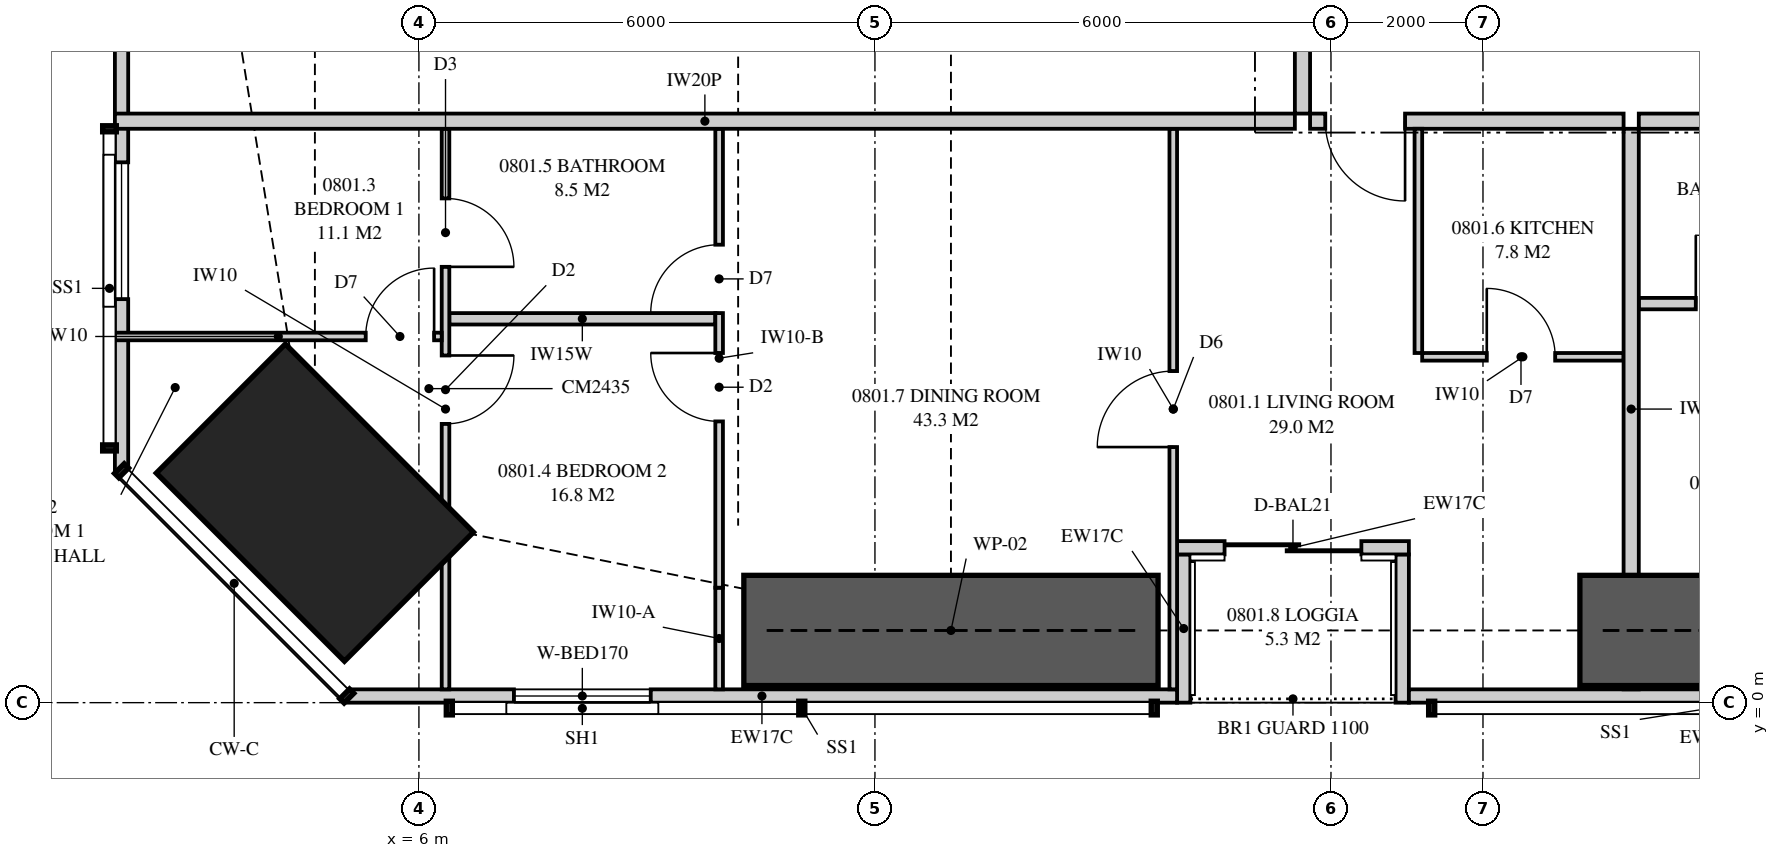
"""IFC4 building model, lengths in metres.
Left out: names, types, materials, properties, quantities, classifications, styles, units other than length and angle.
Written with IfcOpenShell. Run it as: python <this file> out.ifc"""

import sys

from ifc_helpers import new_model, si_unit, direction, frame, frame_2d, origin, origin_2d, place, context, subcontext, project, spatial, polyline, rectangle, outline, extrude, element, fill, save


model = new_model("IFC4")
c1 = context("Model", 3, precision=1e-05, world=origin(), true_north=direction((0.0, 1.0)))
c2 = subcontext(c1, "Body", "Model", "MODEL_VIEW")
j1 = project(units=[si_unit("LENGTHUNIT", "METRE"), si_unit("PLANEANGLEUNIT", "RADIAN")], contexts=[c1])
p1 = place(None, origin())
s1 = spatial("IfcSite", under=j1, at=p1, CompositionType="ELEMENT")
p2 = place(p1, origin())
s2 = spatial("IfcBuilding", under=s1, at=p2, CompositionType="ELEMENT")
p3 = place(p2, frame((0.0, 0.0, 34.4)))
s3 = spatial("IfcBuildingStorey", under=s2, at=p3, CompositionType="ELEMENT", Elevation=34.4)
p4 = place(p3, frame((4.631, 2.631, 0.0), z_axis=(0.0, 0.0, 1.0), x_axis=(0.707106781187, 0.707106781187, 0.0)))
e1 = element("IfcColumn", 1, at=p4, inside=s3, PredefinedType="COLUMN", context=c2, shape_type="SweptSolid", body=[
    extrude(rectangle(XDim=2.4, YDim=3.5, at=origin_2d()), origin(), (0.0, 0.0, 1.0), 3.35),
])
p5 = place(p3, frame((5.051, 0.087, 0.0), z_axis=(0.0, 0.0, 1.0), x_axis=(1.0, 0.0, 0.0)))
e2 = element("IfcWall", 2, at=p5, inside=s3, PredefinedType="SOLIDWALL", context=c2, shape_type="SweptSolid", body=[
    extrude(outline(polyline([(0.0, 0.0), (10.924, 0.0), (10.924, 2.15), (7.949, 2.15), (7.949, 3.11), (7.793, 3.11), (7.793, 2.15), (7.745, 2.15), (7.745, 3.11), (0.0, 3.11), (0.0, 0.0)])), frame((0.0, 0.087, 0.0), z_axis=(0.0, -1.0, 0.0), x_axis=(1.0, 0.0, 0.0)), (0.0, 0.0, 1.0), 0.175),
])
p6 = place(p5, frame((2.199, 0.0, 0.4)))
e3 = element("IfcOpeningElement", 3, at=p6, cuts=e2, PredefinedType="OPENING", context=c2, shape_type="SweptSolid", body=[
    extrude(rectangle(XDim=1.8, YDim=1.7, at=frame_2d((0.9, 0.85))), frame((0.0, 0.097, 0.0), z_axis=(0.0, -1.0, 0.0), x_axis=(1.0, 0.0, 0.0)), (0.0, 0.0, 1.0), 0.195),
])
p7 = place(p3, frame((19.025, 0.087, 0.0), z_axis=(0.0, 0.0, 1.0), x_axis=(1.0, 0.0, 0.0)))
e4 = element("IfcWall", 4, at=p7, inside=s3, PredefinedType="SOLIDWALL", context=c2, shape_type="SweptSolid", body=[
    extrude(rectangle(XDim=7.95, YDim=0.175, at=frame_2d((3.975, 0.0))), origin(), (0.0, 0.0, 1.0), 2.15),
])
p8 = place(p3, frame((15.975, 2.038, 0.0), z_axis=(0.0, 0.0, 1.0), x_axis=(1.0, 0.0, 0.0)))
e5 = element("IfcWall", 5, at=p8, inside=s3, PredefinedType="SOLIDWALL", context=c2, shape_type="SweptSolid", body=[
    extrude(rectangle(XDim=3.05, YDim=0.175, at=frame_2d((1.525, 0.0))), origin(), (0.0, 0.0, 1.0), 3.11),
])
p9 = place(p8, frame((0.625, 0.0, 0.0)))
e6 = element("IfcOpeningElement", 6, at=p9, cuts=e5, PredefinedType="OPENING", context=c2, shape_type="SweptSolid", body=[
    extrude(rectangle(XDim=1.8, YDim=2.1, at=frame_2d((0.9, 1.05))), frame((0.0, 0.097, 0.0), z_axis=(0.0, -1.0, 0.0), x_axis=(1.0, 0.0, 0.0)), (0.0, 0.0, 1.0), 0.195),
])
for number, where, z_axis, x_axis in (
    (7, (16.062, 0.0, 0.0), (0.0, 0.0, 1.0), (0.0, 1.0, 0.0)),
    (8, (18.938, 0.0, 0.0), (0.0, 0.0, 1.0), (0.0, 1.0, 0.0)),
):
    element("IfcWall", number, at=place(p3, frame(where, z_axis=z_axis, x_axis=x_axis)), inside=s3, PredefinedType="SOLIDWALL", context=c2, shape_type="SweptSolid", body=[
        extrude(outline(polyline([(0.0, 0.0), (1.95, 0.0), (1.95, 3.11), (1.75, 3.11), (1.75, 2.15), (0.15, 2.15), (0.15, 3.11), (0.0, 3.11), (0.0, 0.0)])), frame((0.0, 0.087, 0.0), z_axis=(0.0, -1.0, 0.0), x_axis=(1.0, 0.0, 0.0)), (0.0, 0.0, 1.0), 0.175),
    ])
p10 = place(p3, frame((2.087, 15.8, 0.0), z_axis=(0.0, 0.0, 1.0), x_axis=(0.0, -1.0, 0.0)))
e9 = element("IfcWall", 9, at=p10, inside=s3, PredefinedType="SOLIDWALL", context=c2, shape_type="SweptSolid", body=[
    extrude(outline(polyline([(0.0, 0.0), (12.749, 0.0), (12.749, 3.11), (3.019, 3.11), (3.019, 2.15), (2.926, 2.15), (2.926, 3.11), (2.8, 3.11), (2.8, 2.15), (0.0, 2.15), (0.0, 0.0)])), frame((0.0, 0.087, 0.0), z_axis=(0.0, -1.0, 0.0), x_axis=(1.0, 0.0, 0.0)), (0.0, 0.0, 1.0), 0.175),
])
p11 = place(p10, frame((5.65, 0.0, 0.4)))
e10 = element("IfcOpeningElement", 10, at=p11, cuts=e9, PredefinedType="OPENING", context=c2, shape_type="SweptSolid", body=[
    extrude(rectangle(XDim=1.2, YDim=1.7, at=frame_2d((0.6, 0.85))), frame((0.0, 0.097, 0.0), z_axis=(0.0, -1.0, 0.0), x_axis=(1.0, 0.0, 0.0)), (0.0, 0.0, 1.0), 0.195),
])
p12 = place(p10, frame((8.691, 0.0, 0.4)))
e11 = element("IfcOpeningElement", 11, at=p12, cuts=e9, PredefinedType="OPENING", context=c2, shape_type="SweptSolid", body=[
    extrude(rectangle(XDim=1.8, YDim=1.7, at=frame_2d((0.9, 0.85))), frame((0.0, 0.097, 0.0), z_axis=(0.0, -1.0, 0.0), x_axis=(1.0, 0.0, 0.0)), (0.0, 0.0, 1.0), 0.195),
])
p13 = place(p3, frame((21.95, 0.175, 0.0), z_axis=(0.0, 0.0, 1.0), x_axis=(0.0, 1.0, 0.0)))
e12 = element("IfcWall", 12, at=p13, inside=s3, PredefinedType="PARTITIONING", context=c2, shape_type="SweptSolid", body=[
    extrude(outline(polyline([(0.529, 2.15), (0.0, 2.15), (0.0, 0.0), (0.529, 0.0), (0.529, 0.09), (1.021, 0.09), (1.021, 0.0), (7.375, 0.0), (7.375, 3.11), (1.685, 3.11), (1.685, 2.15), (1.021, 2.15), (1.021, 2.06), (0.529, 2.06), (0.529, 2.15)])), frame((0.0, 0.1, 0.0), z_axis=(0.0, -1.0, 0.0), x_axis=(1.0, 0.0, 0.0)), (0.0, 0.0, 1.0), 0.2),
])
p14 = place(p3, frame((17.725, 7.65, 0.0), z_axis=(0.0, 0.0, 1.0), x_axis=(1.0, 0.0, 0.0)))
e13 = element("IfcWall", 13, at=p14, inside=s3, PredefinedType="PARTITIONING", context=c2, shape_type="SweptSolid", body=[
    extrude(rectangle(XDim=4.125, YDim=0.2, at=frame_2d((2.062, 0.0))), origin(), (0.0, 0.0, 1.0), 3.11),
])
p15 = place(p14, frame((0.2, 0.0, 0.0)))
e14 = element("IfcOpeningElement", 14, at=p15, cuts=e13, PredefinedType="OPENING", context=c2, shape_type="SweptSolid", body=[
    extrude(rectangle(XDim=1.05, YDim=2.2, at=frame_2d((0.525, 1.1))), frame((0.0, 0.11, 0.0), z_axis=(0.0, -1.0, 0.0), x_axis=(1.0, 0.0, 0.0)), (0.0, 0.0, 1.0), 0.22),
])
p16 = place(p3, frame((6.35, 0.175, 0.0), z_axis=(0.0, 0.0, 1.0), x_axis=(0.0, 1.0, 0.0)))
e15 = element("IfcWall", 15, at=p16, inside=s3, PredefinedType="PARTITIONING", context=c2, shape_type="SweptSolid", body=[
    extrude(outline(polyline([(0.0, 0.0), (7.375, 0.0), (7.375, 3.11), (2.988, 3.11), (2.988, 2.15), (1.234, 2.15), (1.234, 3.11), (0.0, 3.11), (0.0, 0.0)])), frame((0.0, 0.05, 0.0), z_axis=(0.0, -1.0, 0.0), x_axis=(1.0, 0.0, 0.0)), (0.0, 0.0, 1.0), 0.1),
])
p17 = place(p16, frame((3.492, 0.0, 0.0)))
e16 = element("IfcOpeningElement", 16, at=p17, cuts=e15, PredefinedType="OPENING", context=c2, shape_type="SweptSolid", body=[
    extrude(rectangle(XDim=0.9, YDim=2.1, at=frame_2d((0.45, 1.05))), frame((0.0, 0.06, 0.0), z_axis=(0.0, -1.0, 0.0), x_axis=(1.0, 0.0, 0.0)), (0.0, 0.0, 1.0), 0.12),
])
p18 = place(p16, frame((5.559, 0.0, 0.0)))
e17 = element("IfcOpeningElement", 17, at=p18, cuts=e15, PredefinedType="OPENING", context=c2, shape_type="SweptSolid", body=[
    extrude(rectangle(XDim=0.9, YDim=2.1, at=frame_2d((0.45, 1.05))), frame((0.0, 0.06, 0.0), z_axis=(0.0, -1.0, 0.0), x_axis=(1.0, 0.0, 0.0)), (0.0, 0.0, 1.0), 0.12),
])
p19 = place(p3, frame((9.95, 0.175, 0.0), z_axis=(0.0, 0.0, 1.0), x_axis=(0.0, 1.0, 0.0)))
e18 = element("IfcWall", 18, at=p19, inside=s3, PredefinedType="PARTITIONING", context=c2, shape_type="SweptSolid", body=[
    extrude(outline(polyline([(0.0, 0.0), (1.338, 0.0), (1.338, 2.15), (0.51, 2.15), (0.51, 3.11), (0.0, 3.11), (0.0, 0.0)])), frame((0.0, 0.05, 0.0), z_axis=(0.0, -1.0, 0.0), x_axis=(1.0, 0.0, 0.0)), (0.0, 0.0, 1.0), 0.1),
])
p20 = place(p3, frame((9.95, 1.513, 0.0), z_axis=(0.0, 0.0, 1.0), x_axis=(0.0, 1.0, 0.0)))
e19 = element("IfcWall", 19, at=p20, inside=s3, PredefinedType="PARTITIONING", context=c2, shape_type="SweptSolid", body=[
    extrude(outline(polyline([(0.0, 0.0), (6.037, 0.0), (6.037, 2.51), (0.927, 2.51), (0.927, 2.15), (0.0, 2.15), (0.0, 0.0)])), frame((0.0, 0.05, 0.0), z_axis=(0.0, -1.0, 0.0), x_axis=(1.0, 0.0, 0.0)), (0.0, 0.0, 1.0), 0.1),
])
p21 = place(p20, frame((2.188, 0.0, 0.0)))
e20 = element("IfcOpeningElement", 20, at=p21, cuts=e19, PredefinedType="OPENING", context=c2, shape_type="SweptSolid", body=[
    extrude(rectangle(XDim=0.9, YDim=2.1, at=frame_2d((0.45, 1.05))), frame((0.0, 0.06, 0.0), z_axis=(0.0, -1.0, 0.0), x_axis=(1.0, 0.0, 0.0)), (0.0, 0.0, 1.0), 0.12),
])
p22 = place(p20, frame((3.612, 0.0, 0.0)))
e21 = element("IfcOpeningElement", 21, at=p22, cuts=e19, PredefinedType="OPENING", context=c2, shape_type="SweptSolid", body=[
    extrude(rectangle(XDim=0.9, YDim=2.1, at=frame_2d((0.45, 1.05))), frame((0.0, 0.06, 0.0), z_axis=(0.0, -1.0, 0.0), x_axis=(1.0, 0.0, 0.0)), (0.0, 0.0, 1.0), 0.12),
])
p23 = place(p3, frame((2.0, 4.817, 0.0), z_axis=(0.0, 0.0, 1.0), x_axis=(1.0, 0.0, 0.0)))
e22 = element("IfcWall", 22, at=p23, inside=s3, PredefinedType="PARTITIONING", context=c2, shape_type="SweptSolid", body=[
    extrude(outline(polyline([(0.0, 0.0), (4.3, 0.0), (4.3, 3.11), (3.148, 3.11), (3.148, 2.15), (1.406, 2.15), (1.406, 3.11), (0.0, 3.11), (0.0, 0.0)])), frame((0.0, 0.05, 0.0), z_axis=(0.0, -1.0, 0.0), x_axis=(1.0, 0.0, 0.0)), (0.0, 0.0, 1.0), 0.1),
])
p24 = place(p23, frame((3.3, 0.0, 0.0)))
e23 = element("IfcOpeningElement", 23, at=p24, cuts=e22, PredefinedType="OPENING", context=c2, shape_type="SweptSolid", body=[
    extrude(rectangle(XDim=0.9, YDim=2.1, at=frame_2d((0.45, 1.05))), frame((0.0, 0.06, 0.0), z_axis=(0.0, -1.0, 0.0), x_axis=(1.0, 0.0, 0.0)), (0.0, 0.0, 1.0), 0.12),
])
p25 = place(p3, frame((6.4, 5.05, 0.0), z_axis=(0.0, 0.0, 1.0), x_axis=(1.0, 0.0, 0.0)))
e24 = element("IfcWall", 24, at=p25, inside=s3, PredefinedType="PLUMBINGWALL", context=c2, shape_type="SweptSolid", body=[
    extrude(outline(polyline([(0.0, 0.0), (3.5, 0.0), (3.5, 3.11), (3.5, 2.51), (2.515, 2.51), (2.515, 3.11), (0.0, 3.11), (0.0, 0.0)])), frame((0.0, 0.075, 0.0), z_axis=(0.0, -1.0, 0.0), x_axis=(1.0, 0.0, 0.0)), (0.0, 0.0, 1.0), 0.15),
])
p26 = place(p3, frame((19.2, 4.55, 0.0), z_axis=(0.0, 0.0, 1.0), x_axis=(1.0, 0.0, 0.0)))
e25 = element("IfcWall", 25, at=p26, inside=s3, PredefinedType="PARTITIONING", context=c2, shape_type="SweptSolid", body=[
    extrude(rectangle(XDim=2.65, YDim=0.1, at=frame_2d((1.325, 0.0))), origin(), (0.0, 0.0, 1.0), 3.11),
])
p27 = place(p26, frame((0.85, 0.0, 0.0)))
e26 = element("IfcOpeningElement", 26, at=p27, cuts=e25, PredefinedType="OPENING", context=c2, shape_type="SweptSolid", body=[
    extrude(rectangle(XDim=0.9, YDim=2.1, at=frame_2d((0.45, 1.05))), frame((0.0, 0.06, 0.0), z_axis=(0.0, -1.0, 0.0), x_axis=(1.0, 0.0, 0.0)), (0.0, 0.0, 1.0), 0.12),
])
p28 = place(p3, frame((19.15, 4.6, 0.0), z_axis=(0.0, 0.0, 1.0), x_axis=(0.0, 1.0, 0.0)))
e27 = element("IfcWall", 27, at=p28, inside=s3, PredefinedType="PARTITIONING", context=c2, shape_type="SweptSolid", body=[
    extrude(rectangle(XDim=2.95, YDim=0.1, at=frame_2d((1.475, 0.0))), origin(), (0.0, 0.0, 1.0), 3.11),
])
p29 = place(p3, frame((15.925, 0.175, 0.0), z_axis=(0.0, 0.0, 1.0), x_axis=(0.0, 1.0, 0.0)))
e28 = element("IfcWall", 28, at=p29, inside=s3, PredefinedType="PARTITIONING", context=c2, shape_type="SweptSolid", body=[
    extrude(outline(polyline([(0.0, 0.0), (7.375, 0.0), (7.375, 3.11), (1.635, 3.11), (1.635, 2.15), (0.0, 2.15), (0.0, 3.11), (0.0, 0.0)])), frame((0.0, 0.05, 0.0), z_axis=(0.0, -1.0, 0.0), x_axis=(1.0, 0.0, 0.0)), (0.0, 0.0, 1.0), 0.1),
])
p30 = place(p29, frame((3.188, 0.0, 0.0)))
e29 = element("IfcOpeningElement", 29, at=p30, cuts=e28, PredefinedType="OPENING", context=c2, shape_type="SweptSolid", body=[
    extrude(rectangle(XDim=1.0, YDim=2.1, at=frame_2d((0.5, 1.05))), frame((0.0, 0.06, 0.0), z_axis=(0.0, -1.0, 0.0), x_axis=(1.0, 0.0, 0.0)), (0.0, 0.0, 1.0), 0.12),
])
p31 = place(p3, frame((22.05, 7.65, 0.0), z_axis=(0.0, 0.0, 1.0), x_axis=(1.0, 0.0, 0.0)))
e30 = element("IfcWall", 30, at=p31, inside=s3, PredefinedType="PARTITIONING", context=c2, shape_type="SweptSolid", body=[
    extrude(outline(polyline([(0.0, 0.0), (5.825, 0.0), (5.825, 3.11), (2.287, 3.11), (2.287, 2.541), (1.613, 2.541), (1.613, 3.11), (0.0, 3.11), (0.0, 0.0)])), frame((0.0, 0.1, 0.0), z_axis=(0.0, -1.0, 0.0), x_axis=(1.0, 0.0, 0.0)), (0.0, 0.0, 1.0), 0.2),
])
p32 = place(p3, frame((22.05, 5.25, 0.0), z_axis=(0.0, 0.0, 1.0), x_axis=(1.0, 0.0, 0.0)))
e31 = element("IfcWall", 31, at=p32, inside=s3, PredefinedType="PLUMBINGWALL", context=c2, shape_type="SweptSolid", body=[
    extrude(outline(polyline([(0.0, 0.0), (2.425, 0.0), (2.425, 3.11), (2.262, 3.11), (2.262, 2.541), (1.638, 2.541), (1.638, 3.11), (0.0, 3.11), (0.0, 0.0)])), frame((0.0, 0.075, 0.0), z_axis=(0.0, -1.0, 0.0), x_axis=(1.0, 0.0, 0.0)), (0.0, 0.0, 1.0), 0.15),
])
p33 = place(p32, frame((0.75, 0.0, 0.0)))
e32 = element("IfcOpeningElement", 32, at=p33, cuts=e31, PredefinedType="OPENING", context=c2, shape_type="SweptSolid", body=[
    extrude(rectangle(XDim=0.9, YDim=2.1, at=frame_2d((0.45, 1.05))), frame((0.0, 0.085, 0.0), z_axis=(0.0, -1.0, 0.0), x_axis=(1.0, 0.0, 0.0)), (0.0, 0.0, 1.0), 0.17),
])
p34 = place(p3, frame((2.0, 7.65, 0.0), z_axis=(0.0, 0.0, 1.0), x_axis=(1.0, 0.0, 0.0)))
e33 = element("IfcWall", 33, at=p34, inside=s3, PredefinedType="PARTITIONING", context=c2, shape_type="SweptSolid", body=[
    extrude(outline(polyline([(0.0, 0.0), (15.525, 0.0), (15.525, 3.11), (11.337, 3.11), (11.337, 2.541), (10.663, 2.541), (10.663, 3.11), (9.51, 3.11), (9.51, 2.51), (6.89, 2.51), (6.89, 3.11), (2.969, 3.11), (2.969, 2.541), (2.74, 2.541), (2.74, 2.15), (0.896, 2.15), (0.896, 3.11), (0.0, 3.11), (0.0, 0.0)])), frame((0.0, 0.1, 0.0), z_axis=(0.0, -1.0, 0.0), x_axis=(1.0, 0.0, 0.0)), (0.0, 0.0, 1.0), 0.2),
])
p35 = place(p3, frame((17.625, 7.75, 0.0), z_axis=(0.0, 0.0, 1.0), x_axis=(0.0, 1.0, 0.0)))
e34 = element("IfcWall", 34, at=p35, inside=s3, PredefinedType="PARTITIONING", context=c2, shape_type="SweptSolid", body=[
    extrude(outline(polyline([(0.0, 0.0), (6.15, 0.0), (6.15, 3.11), (5.587, 3.11), (5.587, 2.541), (4.913, 2.541), (4.913, 3.11), (0.0, 3.11), (0.0, 0.0)])), frame((0.0, 0.1, 0.0), z_axis=(0.0, -1.0, 0.0), x_axis=(1.0, 0.0, 0.0)), (0.0, 0.0, 1.0), 0.2),
])
p36 = place(p35, frame((2.175, 0.0, 0.0)))
e35 = element("IfcOpeningElement", 35, at=p36, cuts=e34, PredefinedType="OPENING", context=c2, shape_type="SweptSolid", body=[
    extrude(rectangle(XDim=1.8, YDim=2.1, at=frame_2d((0.9, 1.05))), frame((0.0, 0.11, 0.0), z_axis=(0.0, -1.0, 0.0), x_axis=(1.0, 0.0, 0.0)), (0.0, 0.0, 1.0), 0.22),
])
for number, where, z_axis, x_axis in (
    (36, (10.275, 0.95, 0.0), (0.0, 0.0, 1.0), (1.0, 0.0, 0.0)),
    (37, (21.275, 0.95, 0.0), (0.0, 0.0, 1.0), (1.0, 0.0, 0.0)),
):
    element("IfcWall", number, at=place(p3, frame(where, z_axis=z_axis, x_axis=x_axis)), inside=s3, PredefinedType="SHEAR", context=c2, shape_type="SweptSolid", body=[
        extrude(rectangle(XDim=5.45, YDim=1.45, at=frame_2d((2.725, 0.0))), origin(), (0.0, 0.0, 1.0), 3.35),
    ])
p37 = place(p6, origin())
e38 = element("IfcWindow", 38, at=p37, inside=s3, PartitioningType="SINGLE_PANEL", PredefinedType="WINDOW", context=c2, shape_type="SweptSolid", body=[
    extrude(rectangle(XDim=1.8, YDim=1.7, at=frame_2d((0.9, 0.85))), frame((0.0, 0.03, 0.0), z_axis=(0.0, -1.0, 0.0), x_axis=(1.0, 0.0, 0.0)), (0.0, 0.0, 1.0), 0.06),
])
fill(e3, e38)
p38 = place(p9, origin())
e39 = element("IfcDoor", 39, at=p38, inside=s3, OperationType="SLIDING_TO_LEFT", PredefinedType="DOOR", context=c2, shape_type="SweptSolid", body=[
    extrude(rectangle(XDim=1.8, YDim=2.1, at=frame_2d((0.9, 1.05))), frame((0.0, 0.025, 0.0), z_axis=(0.0, -1.0, 0.0), x_axis=(1.0, 0.0, 0.0)), (0.0, 0.0, 1.0), 0.05),
])
fill(e6, e39)
p39 = place(p12, origin())
e40 = element("IfcWindow", 40, at=p39, inside=s3, PartitioningType="SINGLE_PANEL", PredefinedType="WINDOW", context=c2, shape_type="SweptSolid", body=[
    extrude(rectangle(XDim=1.8, YDim=1.7, at=frame_2d((0.9, 0.85))), frame((0.0, 0.03, 0.0), z_axis=(0.0, -1.0, 0.0), x_axis=(1.0, 0.0, 0.0)), (0.0, 0.0, 1.0), 0.06),
])
fill(e11, e40)
p40 = place(p15, frame((1.05, 0.0, 0.0), z_axis=(0.0, 0.0, 1.0), x_axis=(-1.0, 0.0, 0.0)))
e41 = element("IfcDoor", 41, at=p40, inside=s3, OperationType="SINGLE_SWING_LEFT", PredefinedType="DOOR", context=c2, shape_type="SweptSolid", body=[
    extrude(rectangle(XDim=1.05, YDim=2.2, at=frame_2d((0.525, 1.1))), frame((0.0, 0.025, 0.0), z_axis=(0.0, -1.0, 0.0), x_axis=(1.0, 0.0, 0.0)), (0.0, 0.0, 1.0), 0.05),
])
fill(e14, e41)
p41 = place(p24, origin())
e42 = element("IfcDoor", 42, at=p41, inside=s3, OperationType="SINGLE_SWING_RIGHT", PredefinedType="DOOR", context=c2, shape_type="SweptSolid", body=[
    extrude(rectangle(XDim=0.9, YDim=2.1, at=frame_2d((0.45, 1.05))), frame((0.0, 0.025, 0.0), z_axis=(0.0, -1.0, 0.0), x_axis=(1.0, 0.0, 0.0)), (0.0, 0.0, 1.0), 0.05),
])
fill(e23, e42)
p42 = place(p17, frame((0.9, 0.0, 0.0), z_axis=(0.0, 0.0, 1.0), x_axis=(-1.0, 0.0, 0.0)))
e43 = element("IfcDoor", 43, at=p42, inside=s3, OperationType="SINGLE_SWING_LEFT", PredefinedType="DOOR", context=c2, shape_type="SweptSolid", body=[
    extrude(rectangle(XDim=0.9, YDim=2.1, at=frame_2d((0.45, 1.05))), frame((0.0, 0.025, 0.0), z_axis=(0.0, -1.0, 0.0), x_axis=(1.0, 0.0, 0.0)), (0.0, 0.0, 1.0), 0.05),
])
fill(e16, e43)
p43 = place(p21, origin())
e44 = element("IfcDoor", 44, at=p43, inside=s3, OperationType="SINGLE_SWING_RIGHT", PredefinedType="DOOR", context=c2, shape_type="SweptSolid", body=[
    extrude(rectangle(XDim=0.9, YDim=2.1, at=frame_2d((0.45, 1.05))), frame((0.0, 0.025, 0.0), z_axis=(0.0, -1.0, 0.0), x_axis=(1.0, 0.0, 0.0)), (0.0, 0.0, 1.0), 0.05),
])
fill(e20, e44)
p44 = place(p22, origin())
e45 = element("IfcDoor", 45, at=p44, inside=s3, OperationType="SINGLE_SWING_LEFT", PredefinedType="DOOR", context=c2, shape_type="SweptSolid", body=[
    extrude(rectangle(XDim=0.9, YDim=2.1, at=frame_2d((0.45, 1.05))), frame((0.0, 0.025, 0.0), z_axis=(0.0, -1.0, 0.0), x_axis=(1.0, 0.0, 0.0)), (0.0, 0.0, 1.0), 0.05),
])
fill(e21, e45)
p45 = place(p18, frame((0.9, 0.0, 0.0), z_axis=(0.0, 0.0, 1.0), x_axis=(-1.0, 0.0, 0.0)))
e46 = element("IfcDoor", 46, at=p45, inside=s3, OperationType="SINGLE_SWING_RIGHT", PredefinedType="DOOR", context=c2, shape_type="SweptSolid", body=[
    extrude(rectangle(XDim=0.9, YDim=2.1, at=frame_2d((0.45, 1.05))), frame((0.0, 0.025, 0.0), z_axis=(0.0, -1.0, 0.0), x_axis=(1.0, 0.0, 0.0)), (0.0, 0.0, 1.0), 0.05),
])
fill(e17, e46)
p46 = place(p27, origin())
e47 = element("IfcDoor", 47, at=p46, inside=s3, OperationType="SINGLE_SWING_LEFT", PredefinedType="DOOR", context=c2, shape_type="SweptSolid", body=[
    extrude(rectangle(XDim=0.9, YDim=2.1, at=frame_2d((0.45, 1.05))), frame((0.0, 0.025, 0.0), z_axis=(0.0, -1.0, 0.0), x_axis=(1.0, 0.0, 0.0)), (0.0, 0.0, 1.0), 0.05),
])
fill(e26, e47)
p47 = place(p30, origin())
e48 = element("IfcDoor", 48, at=p47, inside=s3, OperationType="SINGLE_SWING_LEFT", PredefinedType="DOOR", context=c2, shape_type="SweptSolid", body=[
    extrude(rectangle(XDim=1.0, YDim=2.1, at=frame_2d((0.5, 1.05))), frame((0.0, 0.025, 0.0), z_axis=(0.0, -1.0, 0.0), x_axis=(1.0, 0.0, 0.0)), (0.0, 0.0, 1.0), 0.05),
])
fill(e29, e48)
p48 = place(p33, origin())
e49 = element("IfcDoor", 49, at=p48, inside=s3, OperationType="SINGLE_SWING_LEFT", PredefinedType="DOOR", context=c2, shape_type="SweptSolid", body=[
    extrude(rectangle(XDim=0.9, YDim=2.1, at=frame_2d((0.45, 1.05))), frame((0.0, 0.025, 0.0), z_axis=(0.0, -1.0, 0.0), x_axis=(1.0, 0.0, 0.0)), (0.0, 0.0, 1.0), 0.05),
])
fill(e32, e49)
save(model, sys.argv[1])
